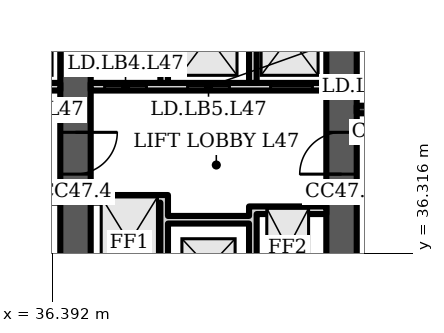
"""IFC4 building model, lengths in metres.
Left out: names, types, materials, properties, quantities, classifications, styles, units other than length and angle.
Written with IfcOpenShell. Run it as: python <this file> out.ifc"""

import sys

from ifc_helpers import new_model, si_unit, direction, frame, frame_2d, origin, place, context, subcontext, project, spatial, polyline, rectangle, outline, extrude, element, fill, save


model = new_model("IFC4")
c1 = context("Model", 3, precision=1e-05, world=origin(), true_north=direction((0.0, 1.0)))
c2 = subcontext(c1, "Body", "Model", "MODEL_VIEW")
j1 = project(units=[si_unit("LENGTHUNIT", "METRE"), si_unit("PLANEANGLEUNIT", "RADIAN")], contexts=[c1])
p1 = place(None, origin())
s1 = spatial("IfcSite", under=j1, at=p1, CompositionType="ELEMENT")
p2 = place(p1, origin())
s2 = spatial("IfcBuilding", under=s1, at=p2, CompositionType="ELEMENT")
p3 = place(p2, frame((0.0, 0.0, 191.5)))
s3 = spatial("IfcBuildingStorey", under=s2, at=p3, CompositionType="ELEMENT", Elevation=191.5)
p4 = place(p3, frame((37.0, 34.8, 0.0), z_axis=(0.0, 0.0, 1.0), x_axis=(0.0, 1.0, 0.0)))
e1 = element("IfcWall", 1, at=p4, inside=s3, PredefinedType="SHEAR", context=c2, shape_type="SweptSolid", body=[
    extrude(rectangle(XDim=14.987, YDim=0.8, at=frame_2d((7.493, 0.0))), origin(), (0.0, 0.0, 1.0), 3.6),
])
p5 = place(p4, frame((11.312, 0.0, 0.0)))
e2 = element("IfcOpeningElement", 2, at=p5, cuts=e1, PredefinedType="OPENING", context=c2, shape_type="SweptSolid", body=[
    extrude(rectangle(XDim=1.0, YDim=2.1, at=frame_2d((0.5, 1.05))), frame((0.0, 0.41, 0.0), z_axis=(0.0, -1.0, 0.0), x_axis=(1.0, 0.0, 0.0)), (0.0, 0.0, 1.0), 0.82),
])
p6 = place(p4, frame((3.6, 0.0, 0.0)))
e3 = element("IfcOpeningElement", 3, at=p6, cuts=e1, PredefinedType="OPENING", context=c2, shape_type="SweptSolid", body=[
    extrude(rectangle(XDim=1.1, YDim=2.1, at=frame_2d((0.55, 1.05))), frame((0.0, 0.41, 0.0), z_axis=(0.0, -1.0, 0.0), x_axis=(1.0, 0.0, 0.0)), (0.0, 0.0, 1.0), 0.82),
])
p7 = place(p3, frame((44.0, 34.8, 0.0), z_axis=(0.0, 0.0, 1.0), x_axis=(0.0, 1.0, 0.0)))
e4 = element("IfcWall", 4, at=p7, inside=s3, PredefinedType="SHEAR", context=c2, shape_type="SweptSolid", body=[
    extrude(rectangle(XDim=14.374, YDim=0.8, at=frame_2d((7.187, 0.0))), origin(), (0.0, 0.0, 1.0), 3.6),
])
p8 = place(p7, frame((11.312, 0.0, 0.0)))
e5 = element("IfcOpeningElement", 5, at=p8, cuts=e4, PredefinedType="OPENING", context=c2, shape_type="SweptSolid", body=[
    extrude(rectangle(XDim=1.0, YDim=2.1, at=frame_2d((0.5, 1.05))), frame((0.0, 0.41, 0.0), z_axis=(0.0, -1.0, 0.0), x_axis=(1.0, 0.0, 0.0)), (0.0, 0.0, 1.0), 0.82),
])
p9 = place(p7, frame((3.6, 0.0, 0.0)))
e6 = element("IfcOpeningElement", 6, at=p9, cuts=e4, PredefinedType="OPENING", context=c2, shape_type="SweptSolid", body=[
    extrude(rectangle(XDim=1.1, YDim=2.1, at=frame_2d((0.55, 1.05))), frame((0.0, 0.41, 0.0), z_axis=(0.0, -1.0, 0.0), x_axis=(1.0, 0.0, 0.0)), (0.0, 0.0, 1.0), 0.82),
])
p10 = place(p3, frame((30.4, 40.7, 0.0), z_axis=(0.0, 0.0, 1.0), x_axis=(1.0, 0.0, 0.0)))
e7 = element("IfcWall", 7, at=p10, inside=s3, PredefinedType="PARTITIONING", context=c2, shape_type="SweptSolid", body=[
    extrude(rectangle(XDim=6.2, YDim=0.2, at=frame_2d((3.1, 0.0))), origin(), (0.0, 0.0, 1.0), 3.2),
])
p11 = place(p10, frame((0.367, 0.0, 0.0)))
e8 = element("IfcOpeningElement", 8, at=p11, cuts=e7, PredefinedType="OPENING", context=c2, shape_type="SweptSolid", body=[
    extrude(rectangle(XDim=1.1, YDim=2.1, at=frame_2d((0.55, 1.05))), frame((0.0, 0.11, 0.0), z_axis=(0.0, -1.0, 0.0), x_axis=(1.0, 0.0, 0.0)), (0.0, 0.0, 1.0), 0.22),
])
p12 = place(p10, frame((2.55, 0.0, 0.0)))
e9 = element("IfcOpeningElement", 9, at=p12, cuts=e7, PredefinedType="OPENING", context=c2, shape_type="SweptSolid", body=[
    extrude(rectangle(XDim=1.1, YDim=2.1, at=frame_2d((0.55, 1.05))), frame((0.0, 0.11, 0.0), z_axis=(0.0, -1.0, 0.0), x_axis=(1.0, 0.0, 0.0)), (0.0, 0.0, 1.0), 0.22),
])
p13 = place(p10, frame((4.733, 0.0, 0.0)))
e10 = element("IfcOpeningElement", 10, at=p13, cuts=e7, PredefinedType="OPENING", context=c2, shape_type="SweptSolid", body=[
    extrude(rectangle(XDim=1.1, YDim=2.1, at=frame_2d((0.55, 1.05))), frame((0.0, 0.11, 0.0), z_axis=(0.0, -1.0, 0.0), x_axis=(1.0, 0.0, 0.0)), (0.0, 0.0, 1.0), 0.22),
])
p14 = place(p3, frame((0.0, 0.0, -0.0)))
e11 = element("IfcWall", 11, at=p14, inside=s3, PredefinedType="PARTITIONING", context=c2, shape_type="SweptSolid", body=[
    extrude(outline(polyline([(34.567, 37.85), (34.767, 37.85), (36.6, 37.85), (36.6, 37.65), (34.767, 37.65), (34.767, 34.8), (34.567, 34.8), (34.567, 37.85)])), origin(), (0.0, 0.0, 1.0), 3.2),
])
p15 = place(p3, frame((0.0, 0.0, -0.0)))
e12 = element("IfcWall", 12, at=p15, inside=s3, PredefinedType="PARTITIONING", context=c2, shape_type="SweptSolid", body=[
    extrude(outline(polyline([(32.433, 40.8), (32.233, 40.8), (32.233, 43.8), (30.4, 43.8), (30.4, 44.0), (36.6, 44.0), (36.6, 43.8), (34.767, 43.8), (34.767, 40.8), (34.567, 40.8), (34.567, 43.8), (32.433, 43.8), (32.433, 40.8)])), origin(), (0.0, 0.0, 1.0), 3.2),
])
p16 = place(p3, frame((37.4, 40.7, 0.0), z_axis=(0.0, 0.0, 1.0), x_axis=(1.0, 0.0, 0.0)))
e13 = element("IfcWall", 13, at=p16, inside=s3, PredefinedType="PARTITIONING", context=c2, shape_type="SweptSolid", body=[
    extrude(rectangle(XDim=6.2, YDim=0.2, at=frame_2d((3.1, 0.0))), origin(), (0.0, 0.0, 1.0), 3.2),
])
p17 = place(p16, frame((0.367, 0.0, 0.0)))
e14 = element("IfcOpeningElement", 14, at=p17, cuts=e13, PredefinedType="OPENING", context=c2, shape_type="SweptSolid", body=[
    extrude(rectangle(XDim=1.1, YDim=2.1, at=frame_2d((0.55, 1.05))), frame((0.0, 0.11, 0.0), z_axis=(0.0, -1.0, 0.0), x_axis=(1.0, 0.0, 0.0)), (0.0, 0.0, 1.0), 0.22),
])
p18 = place(p16, frame((2.55, 0.0, 0.0)))
e15 = element("IfcOpeningElement", 15, at=p18, cuts=e13, PredefinedType="OPENING", context=c2, shape_type="SweptSolid", body=[
    extrude(rectangle(XDim=1.1, YDim=2.1, at=frame_2d((0.55, 1.05))), frame((0.0, 0.11, 0.0), z_axis=(0.0, -1.0, 0.0), x_axis=(1.0, 0.0, 0.0)), (0.0, 0.0, 1.0), 0.22),
])
p19 = place(p16, frame((4.733, 0.0, 0.0)))
e16 = element("IfcOpeningElement", 16, at=p19, cuts=e13, PredefinedType="OPENING", context=c2, shape_type="SweptSolid", body=[
    extrude(rectangle(XDim=1.1, YDim=2.1, at=frame_2d((0.55, 1.05))), frame((0.0, 0.11, 0.0), z_axis=(0.0, -1.0, 0.0), x_axis=(1.0, 0.0, 0.0)), (0.0, 0.0, 1.0), 0.22),
])
p20 = place(p3, frame((0.0, 0.0, -0.0)))
e17 = element("IfcWall", 17, at=p20, inside=s3, PredefinedType="PARTITIONING", context=c2, shape_type="SweptSolid", body=[
    extrude(outline(polyline([(41.567, 37.1), (39.433, 37.1), (39.433, 34.8), (39.233, 34.8), (39.233, 37.65), (37.4, 37.65), (37.4, 37.85), (39.233, 37.85), (39.433, 37.85), (39.433, 37.3), (41.567, 37.3), (41.567, 37.55), (41.767, 37.55), (43.6, 37.55), (43.6, 37.35), (41.767, 37.35), (41.767, 34.8), (41.567, 34.8), (41.567, 37.1)])), origin(), (0.0, 0.0, 1.0), 3.2),
])
p21 = place(p3, frame((0.0, 0.0, -0.0)))
e18 = element("IfcWall", 18, at=p21, inside=s3, PredefinedType="PARTITIONING", context=c2, shape_type="SweptSolid", body=[
    extrude(outline(polyline([(39.433, 40.8), (39.233, 40.8), (39.233, 43.8), (37.4, 43.8), (37.4, 44.0), (43.6, 44.0), (43.6, 43.8), (41.767, 43.8), (41.767, 40.8), (41.567, 40.8), (41.567, 43.8), (39.433, 43.8), (39.433, 40.8)])), origin(), (0.0, 0.0, 1.0), 3.2),
])
p22 = place(p3, frame((44.4, 40.1, 0.0), z_axis=(0.0, 0.0, 1.0), x_axis=(1.0, 0.0, 0.0)))
e19 = element("IfcWall", 19, at=p22, inside=s3, PredefinedType="SHEAR", context=c2, shape_type="SweptSolid", body=[
    extrude(rectangle(XDim=6.2, YDim=0.2, at=frame_2d((3.1, 0.0))), origin(), (0.0, 0.0, 1.0), 3.2),
])
p23 = place(p22, frame((3.525, 0.0, 0.0)))
e20 = element("IfcOpeningElement", 20, at=p23, cuts=e19, PredefinedType="OPENING", context=c2, shape_type="SweptSolid", body=[
    extrude(rectangle(XDim=1.2, YDim=2.1, at=frame_2d((0.6, 1.05))), frame((0.0, 0.11, 0.0), z_axis=(0.0, -1.0, 0.0), x_axis=(1.0, 0.0, 0.0)), (0.0, 0.0, 1.0), 0.22),
])
p24 = place(p22, frame((0.575, 0.0, 0.0)))
e21 = element("IfcOpeningElement", 21, at=p24, cuts=e19, PredefinedType="OPENING", context=c2, shape_type="SweptSolid", body=[
    extrude(rectangle(XDim=0.9, YDim=2.1, at=frame_2d((0.45, 1.05))), frame((0.0, 0.11, 0.0), z_axis=(0.0, -1.0, 0.0), x_axis=(1.0, 0.0, 0.0)), (0.0, 0.0, 1.0), 0.22),
])
p25 = place(p17, origin())
e22 = element("IfcDoor", 22, at=p25, inside=s3, OperationType="DOUBLE_DOOR_SLIDING", PredefinedType="DOOR", context=c2, shape_type="SweptSolid", body=[
    extrude(rectangle(XDim=1.1, YDim=2.1, at=frame_2d((0.55, 1.05))), frame((0.0, 0.025, 0.0), z_axis=(0.0, -1.0, 0.0), x_axis=(1.0, 0.0, 0.0)), (0.0, 0.0, 1.0), 0.05),
])
fill(e14, e22)
p26 = place(p18, origin())
e23 = element("IfcDoor", 23, at=p26, inside=s3, OperationType="DOUBLE_DOOR_SLIDING", PredefinedType="DOOR", context=c2, shape_type="SweptSolid", body=[
    extrude(rectangle(XDim=1.1, YDim=2.1, at=frame_2d((0.55, 1.05))), frame((0.0, 0.025, 0.0), z_axis=(0.0, -1.0, 0.0), x_axis=(1.0, 0.0, 0.0)), (0.0, 0.0, 1.0), 0.05),
])
fill(e15, e23)
p27 = place(p19, origin())
e24 = element("IfcDoor", 24, at=p27, inside=s3, OperationType="DOUBLE_DOOR_SLIDING", PredefinedType="DOOR", context=c2, shape_type="SweptSolid", body=[
    extrude(rectangle(XDim=1.1, YDim=2.1, at=frame_2d((0.55, 1.05))), frame((0.0, 0.025, 0.0), z_axis=(0.0, -1.0, 0.0), x_axis=(1.0, 0.0, 0.0)), (0.0, 0.0, 1.0), 0.05),
])
fill(e16, e24)
p28 = place(p6, origin())
e25 = element("IfcDoor", 25, at=p28, inside=s3, OperationType="SINGLE_SWING_RIGHT", PredefinedType="DOOR", context=c2, shape_type="SweptSolid", body=[
    extrude(rectangle(XDim=1.1, YDim=2.1, at=frame_2d((0.55, 1.05))), frame((0.0, 0.025, 0.0), z_axis=(0.0, -1.0, 0.0), x_axis=(1.0, 0.0, 0.0)), (0.0, 0.0, 1.0), 0.05),
])
fill(e3, e25)
p29 = place(p9, origin())
e26 = element("IfcDoor", 26, at=p29, inside=s3, OperationType="SINGLE_SWING_LEFT", PredefinedType="DOOR", context=c2, shape_type="SweptSolid", body=[
    extrude(rectangle(XDim=1.1, YDim=2.1, at=frame_2d((0.55, 1.05))), frame((0.0, 0.025, 0.0), z_axis=(0.0, -1.0, 0.0), x_axis=(1.0, 0.0, 0.0)), (0.0, 0.0, 1.0), 0.05),
])
fill(e6, e26)
save(model, sys.argv[1])
